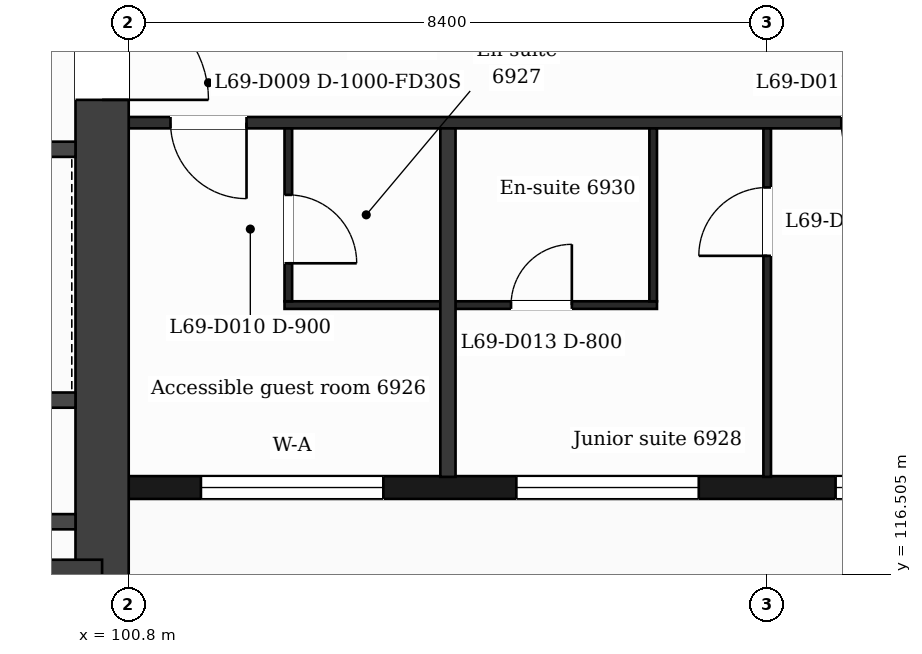
"""IFC4 building model, lengths in metres.
Left out: names, types, materials, properties, quantities, classifications, styles, units other than length and angle.
Written with IfcOpenShell. Run it as: python <this file> out.ifc"""

import sys

from ifc_helpers import new_model, si_unit, direction, frame, frame_2d, origin, place, context, subcontext, project, spatial, rectangle, extrude, element, fill, save


model = new_model("IFC4")
c1 = context("Model", 3, precision=1e-05, world=origin(), true_north=direction((0.0, 1.0)))
c2 = subcontext(c1, "Body", "Model", "MODEL_VIEW")
j1 = project(units=[si_unit("LENGTHUNIT", "METRE"), si_unit("PLANEANGLEUNIT", "RADIAN")], contexts=[c1])
p1 = place(None, origin())
s1 = spatial("IfcSite", under=j1, at=p1, CompositionType="ELEMENT")
p2 = place(p1, origin())
s2 = spatial("IfcBuilding", under=s1, at=p2, CompositionType="ELEMENT")
p3 = place(p2, frame((0.0, 0.0, 284.9)))
s3 = spatial("IfcBuildingStorey", under=s2, at=p3, CompositionType="ELEMENT", Elevation=284.9)
p4 = place(p3, frame((100.45, 132.05, 0.0), z_axis=(0.0, 0.0, 1.0), x_axis=(0.0, -1.0, 0.0)))
e1 = element("IfcWall", 1, at=p4, inside=s3, PredefinedType="SHEAR", context=c2, shape_type="SweptSolid", body=[
    extrude(rectangle(XDim=15.7, YDim=0.7, at=frame_2d((7.85, 0.0))), origin(), (0.0, 0.0, 1.0), 3.7),
])
p5 = place(p4, frame((7.9, 0.0, 0.0)))
e2 = element("IfcOpeningElement", 2, at=p5, cuts=e1, PredefinedType="OPENING", context=c2, shape_type="SweptSolid", body=[
    extrude(rectangle(XDim=1.4, YDim=2.1, at=frame_2d((0.7, 1.05))), frame((0.0, 0.36, 0.0), z_axis=(0.0, -1.0, 0.0), x_axis=(1.0, 0.0, 0.0)), (0.0, 0.0, 1.0), 0.72),
])
p6 = place(p3, frame((100.45, 116.35, 0.0), z_axis=(0.0, 0.0, 1.0), x_axis=(-1.0, 0.0, 0.0)))
e3 = element("IfcWall", 3, at=p6, inside=s3, PredefinedType="SHEAR", context=c2, shape_type="SweptSolid", body=[
    extrude(rectangle(XDim=13.627, YDim=0.7, at=frame_2d((6.813, 0.0))), origin(), (0.0, 0.0, 1.0), 3.7),
])
p7 = place(p3, frame((100.8, 117.65, 0.0), z_axis=(0.0, 0.0, 1.0), x_axis=(1.0, 0.0, 0.0)))
e4 = element("IfcWall", 4, at=p7, inside=s3, PredefinedType="SOLIDWALL", context=c2, shape_type="SweptSolid", body=[
    extrude(rectangle(XDim=25.2, YDim=0.3, at=frame_2d((12.6, 0.0))), origin(), (0.0, 0.0, 1.0), 3.38),
])
p8 = place(p7, frame((0.95, 0.0, 0.9)))
e5 = element("IfcOpeningElement", 5, at=p8, cuts=e4, PredefinedType="OPENING", context=c2, shape_type="SweptSolid", body=[
    extrude(rectangle(XDim=2.4, YDim=2.1, at=frame_2d((1.2, 1.05))), frame((0.0, 0.16, 0.0), z_axis=(0.0, -1.0, 0.0), x_axis=(1.0, 0.0, 0.0)), (0.0, 0.0, 1.0), 0.32),
])
p9 = place(p7, frame((5.1, 0.0, 0.9)))
e6 = element("IfcOpeningElement", 6, at=p9, cuts=e4, PredefinedType="OPENING", context=c2, shape_type="SweptSolid", body=[
    extrude(rectangle(XDim=2.4, YDim=2.1, at=frame_2d((1.2, 1.05))), frame((0.0, 0.16, 0.0), z_axis=(0.0, -1.0, 0.0), x_axis=(1.0, 0.0, 0.0)), (0.0, 0.0, 1.0), 0.32),
])
p10 = place(p7, frame((9.3, 0.0, 0.9)))
e7 = element("IfcOpeningElement", 7, at=p10, cuts=e4, PredefinedType="OPENING", context=c2, shape_type="SweptSolid", body=[
    extrude(rectangle(XDim=2.4, YDim=2.1, at=frame_2d((1.2, 1.05))), frame((0.0, 0.16, 0.0), z_axis=(0.0, -1.0, 0.0), x_axis=(1.0, 0.0, 0.0)), (0.0, 0.0, 1.0), 0.32),
])
p11 = place(p7, frame((14.1, 0.0, 0.9)))
e8 = element("IfcOpeningElement", 8, at=p11, cuts=e4, PredefinedType="OPENING", context=c2, shape_type="SweptSolid", body=[
    extrude(rectangle(XDim=1.2, YDim=2.1, at=frame_2d((0.6, 1.05))), frame((0.0, 0.16, 0.0), z_axis=(0.0, -1.0, 0.0), x_axis=(1.0, 0.0, 0.0)), (0.0, 0.0, 1.0), 0.32),
])
p12 = place(p7, frame((18.3, 0.0, 0.9)))
e9 = element("IfcOpeningElement", 9, at=p12, cuts=e4, PredefinedType="OPENING", context=c2, shape_type="SweptSolid", body=[
    extrude(rectangle(XDim=1.2, YDim=2.1, at=frame_2d((0.6, 1.05))), frame((0.0, 0.16, 0.0), z_axis=(0.0, -1.0, 0.0), x_axis=(1.0, 0.0, 0.0)), (0.0, 0.0, 1.0), 0.32),
])
p13 = place(p7, frame((21.75, 0.0, 0.0)))
e10 = element("IfcOpeningElement", 10, at=p13, cuts=e4, PredefinedType="OPENING", context=c2, shape_type="SweptSolid", body=[
    extrude(rectangle(XDim=1.2, YDim=2.4, at=frame_2d((0.6, 1.2))), frame((0.0, 0.16, 0.0), z_axis=(0.0, -1.0, 0.0), x_axis=(1.0, 0.0, 0.0)), (0.0, 0.0, 1.0), 0.32),
])
p14 = place(p7, frame((23.55, 0.0, 0.9)))
e11 = element("IfcOpeningElement", 11, at=p14, cuts=e4, PredefinedType="OPENING", context=c2, shape_type="SweptSolid", body=[
    extrude(rectangle(XDim=1.2, YDim=2.1, at=frame_2d((0.6, 1.05))), frame((0.0, 0.16, 0.0), z_axis=(0.0, -1.0, 0.0), x_axis=(1.0, 0.0, 0.0)), (0.0, 0.0, 1.0), 0.32),
])
for number, where, z_axis, x_axis in (
    (12, (95.227, 117.2, 0.0), (0.0, 0.0, 1.0), (1.0, 0.0, 0.0)),
    (13, (95.227, 118.8, 0.0), (0.0, 0.0, 1.0), (1.0, 0.0, 0.0)),
):
    element("IfcWall", number, at=place(p3, frame(where, z_axis=z_axis, x_axis=x_axis)), inside=s3, PredefinedType="PARTITIONING", context=c2, shape_type="SweptSolid", body=[
        extrude(rectangle(XDim=4.873, YDim=0.2, at=frame_2d((2.437, 0.0))), origin(), (0.0, 0.0, 1.0), 3.38),
    ])
p15 = place(p3, frame((102.85, 120.05, 0.0), z_axis=(0.0, 0.0, 1.0), x_axis=(1.0, 0.0, 0.0)))
e14 = element("IfcWall", 14, at=p15, inside=s3, PredefinedType="PARTITIONING", context=c2, shape_type="SweptSolid", body=[
    extrude(rectangle(XDim=4.9, YDim=0.1, at=frame_2d((2.45, 0.0))), origin(), (0.0, 0.0, 1.0), 3.38),
])
p16 = place(p15, frame((2.98, 0.0, 0.0)))
e15 = element("IfcOpeningElement", 15, at=p16, cuts=e14, PredefinedType="OPENING", context=c2, shape_type="SweptSolid", body=[
    extrude(rectangle(XDim=0.8, YDim=2.1, at=frame_2d((0.4, 1.05))), frame((0.0, 0.06, 0.0), z_axis=(0.0, -1.0, 0.0), x_axis=(1.0, 0.0, 0.0)), (0.0, 0.0, 1.0), 0.12),
])
p17 = place(p3, frame((95.227, 122.1, 0.0), z_axis=(0.0, 0.0, 1.0), x_axis=(1.0, 0.0, 0.0)))
e16 = element("IfcWall", 16, at=p17, inside=s3, PredefinedType="PARTITIONING", context=c2, shape_type="SweptSolid", body=[
    extrude(rectangle(XDim=4.873, YDim=0.2, at=frame_2d((2.437, 0.0))), origin(), (0.0, 0.0, 1.0), 3.38),
])
p18 = place(p17, frame((0.605, 0.0, 0.0)))
e17 = element("IfcOpeningElement", 17, at=p18, cuts=e16, PredefinedType="OPENING", context=c2, shape_type="SweptSolid", body=[
    extrude(rectangle(XDim=1.1, YDim=2.1, at=frame_2d((0.55, 1.05))), frame((0.0, 0.11, 0.0), z_axis=(0.0, -1.0, 0.0), x_axis=(1.0, 0.0, 0.0)), (0.0, 0.0, 1.0), 0.22),
])
p19 = place(p17, frame((2.946, 0.0, 0.0)))
e18 = element("IfcOpeningElement", 18, at=p19, cuts=e16, PredefinedType="OPENING", context=c2, shape_type="SweptSolid", body=[
    extrude(rectangle(XDim=1.1, YDim=2.1, at=frame_2d((0.55, 1.05))), frame((0.0, 0.11, 0.0), z_axis=(0.0, -1.0, 0.0), x_axis=(1.0, 0.0, 0.0)), (0.0, 0.0, 1.0), 0.22),
])
p20 = place(p3, frame((100.8, 122.45, 0.0), z_axis=(0.0, 0.0, 1.0), x_axis=(1.0, 0.0, 0.0)))
e19 = element("IfcWall", 19, at=p20, inside=s3, PredefinedType="PARTITIONING", context=c2, shape_type="SweptSolid", body=[
    extrude(rectangle(XDim=25.2, YDim=0.15, at=frame_2d((12.6, 0.0))), origin(), (0.0, 0.0, 1.0), 3.38),
])
p21 = place(p20, frame((0.55, 0.0, 0.0)))
e20 = element("IfcOpeningElement", 20, at=p21, cuts=e19, PredefinedType="OPENING", context=c2, shape_type="SweptSolid", body=[
    extrude(rectangle(XDim=1.0, YDim=2.1, at=frame_2d((0.5, 1.05))), frame((0.0, 0.085, 0.0), z_axis=(0.0, -1.0, 0.0), x_axis=(1.0, 0.0, 0.0)), (0.0, 0.0, 1.0), 0.17),
])
p22 = place(p20, frame((9.375, 0.0, 0.0)))
e21 = element("IfcOpeningElement", 21, at=p22, cuts=e19, PredefinedType="OPENING", context=c2, shape_type="SweptSolid", body=[
    extrude(rectangle(XDim=1.0, YDim=2.1, at=frame_2d((0.5, 1.05))), frame((0.0, 0.085, 0.0), z_axis=(0.0, -1.0, 0.0), x_axis=(1.0, 0.0, 0.0)), (0.0, 0.0, 1.0), 0.17),
])
p23 = place(p20, frame((13.23, 0.0, 0.0)))
e22 = element("IfcOpeningElement", 22, at=p23, cuts=e19, PredefinedType="OPENING", context=c2, shape_type="SweptSolid", body=[
    extrude(rectangle(XDim=1.0, YDim=2.1, at=frame_2d((0.5, 1.05))), frame((0.0, 0.085, 0.0), z_axis=(0.0, -1.0, 0.0), x_axis=(1.0, 0.0, 0.0)), (0.0, 0.0, 1.0), 0.17),
])
p24 = place(p20, frame((19.513, 0.0, 0.0)))
e23 = element("IfcOpeningElement", 23, at=p24, cuts=e19, PredefinedType="OPENING", context=c2, shape_type="SweptSolid", body=[
    extrude(rectangle(XDim=0.95, YDim=2.1, at=frame_2d((0.475, 1.05))), frame((0.0, 0.085, 0.0), z_axis=(0.0, -1.0, 0.0), x_axis=(1.0, 0.0, 0.0)), (0.0, 0.0, 1.0), 0.17),
])
p25 = place(p20, frame((21.7, 0.0, 0.0)))
e24 = element("IfcOpeningElement", 24, at=p25, cuts=e19, PredefinedType="OPENING", context=c2, shape_type="SweptSolid", body=[
    extrude(rectangle(XDim=1.0, YDim=2.1, at=frame_2d((0.5, 1.05))), frame((0.0, 0.085, 0.0), z_axis=(0.0, -1.0, 0.0), x_axis=(1.0, 0.0, 0.0)), (0.0, 0.0, 1.0), 0.17),
])
p26 = place(p3, frame((102.9, 120.1, 0.0), z_axis=(0.0, 0.0, 1.0), x_axis=(0.0, 1.0, 0.0)))
e25 = element("IfcWall", 25, at=p26, inside=s3, PredefinedType="PARTITIONING", context=c2, shape_type="SweptSolid", body=[
    extrude(rectangle(XDim=2.275, YDim=0.1, at=frame_2d((1.137, 0.0))), origin(), (0.0, 0.0, 1.0), 3.38),
])
p27 = place(p26, frame((0.5, 0.0, 0.0)))
e26 = element("IfcOpeningElement", 26, at=p27, cuts=e25, PredefinedType="OPENING", context=c2, shape_type="SweptSolid", body=[
    extrude(rectangle(XDim=0.9, YDim=2.1, at=frame_2d((0.45, 1.05))), frame((0.0, 0.06, 0.0), z_axis=(0.0, -1.0, 0.0), x_axis=(1.0, 0.0, 0.0)), (0.0, 0.0, 1.0), 0.12),
])
p28 = place(p3, frame((105.0, 117.79, 0.0), z_axis=(0.0, 0.0, 1.0), x_axis=(0.0, 1.0, 0.0)))
e27 = element("IfcWall", 27, at=p28, inside=s3, PredefinedType="PARTITIONING", context=c2, shape_type="SweptSolid", body=[
    extrude(rectangle(XDim=4.585, YDim=0.2, at=frame_2d((2.292, 0.0))), origin(), (0.0, 0.0, 1.0), 3.38),
])
p29 = place(p3, frame((107.7, 120.1, 0.0), z_axis=(0.0, 0.0, 1.0), x_axis=(0.0, 1.0, 0.0)))
e28 = element("IfcWall", 28, at=p29, inside=s3, PredefinedType="PARTITIONING", context=c2, shape_type="SweptSolid", body=[
    extrude(rectangle(XDim=2.275, YDim=0.1, at=frame_2d((1.137, 0.0))), origin(), (0.0, 0.0, 1.0), 3.38),
])
p30 = place(p3, frame((109.2, 117.79, 0.0), z_axis=(0.0, 0.0, 1.0), x_axis=(0.0, 1.0, 0.0)))
e29 = element("IfcWall", 29, at=p30, inside=s3, PredefinedType="PARTITIONING", context=c2, shape_type="SweptSolid", body=[
    extrude(rectangle(XDim=4.585, YDim=0.1, at=frame_2d((2.292, 0.0))), origin(), (0.0, 0.0, 1.0), 3.38),
])
p31 = place(p30, frame((2.908, 0.0, 0.0)))
e30 = element("IfcOpeningElement", 30, at=p31, cuts=e29, PredefinedType="OPENING", context=c2, shape_type="SweptSolid", body=[
    extrude(rectangle(XDim=0.9, YDim=2.1, at=frame_2d((0.45, 1.05))), frame((0.0, 0.06, 0.0), z_axis=(0.0, -1.0, 0.0), x_axis=(1.0, 0.0, 0.0)), (0.0, 0.0, 1.0), 0.12),
])
p32 = place(p8, origin())
e31 = element("IfcWindow", 31, at=p32, inside=s3, PartitioningType="SINGLE_PANEL", PredefinedType="WINDOW", context=c2, shape_type="SweptSolid", body=[
    extrude(rectangle(XDim=2.4, YDim=2.1, at=frame_2d((1.2, 1.05))), frame((0.0, 0.03, 0.0), z_axis=(0.0, -1.0, 0.0), x_axis=(1.0, 0.0, 0.0)), (0.0, 0.0, 1.0), 0.06),
])
fill(e5, e31)
p33 = place(p9, origin())
e32 = element("IfcWindow", 32, at=p33, inside=s3, PartitioningType="SINGLE_PANEL", PredefinedType="WINDOW", context=c2, shape_type="SweptSolid", body=[
    extrude(rectangle(XDim=2.4, YDim=2.1, at=frame_2d((1.2, 1.05))), frame((0.0, 0.03, 0.0), z_axis=(0.0, -1.0, 0.0), x_axis=(1.0, 0.0, 0.0)), (0.0, 0.0, 1.0), 0.06),
])
fill(e6, e32)
p34 = place(p10, origin())
e33 = element("IfcWindow", 33, at=p34, inside=s3, PartitioningType="SINGLE_PANEL", PredefinedType="WINDOW", context=c2, shape_type="SweptSolid", body=[
    extrude(rectangle(XDim=2.4, YDim=2.1, at=frame_2d((1.2, 1.05))), frame((0.0, 0.03, 0.0), z_axis=(0.0, -1.0, 0.0), x_axis=(1.0, 0.0, 0.0)), (0.0, 0.0, 1.0), 0.06),
])
fill(e7, e33)
p35 = place(p21, origin())
e34 = element("IfcDoor", 34, at=p35, inside=s3, OperationType="SINGLE_SWING_RIGHT", PredefinedType="DOOR", context=c2, shape_type="SweptSolid", body=[
    extrude(rectangle(XDim=1.0, YDim=2.1, at=frame_2d((0.5, 1.05))), frame((0.0, 0.025, 0.0), z_axis=(0.0, -1.0, 0.0), x_axis=(1.0, 0.0, 0.0)), (0.0, 0.0, 1.0), 0.05),
])
fill(e20, e34)
p36 = place(p27, origin())
e35 = element("IfcDoor", 35, at=p36, inside=s3, OperationType="SINGLE_SWING_LEFT", PredefinedType="DOOR", context=c2, shape_type="SweptSolid", body=[
    extrude(rectangle(XDim=0.9, YDim=2.1, at=frame_2d((0.45, 1.05))), frame((0.0, 0.025, 0.0), z_axis=(0.0, -1.0, 0.0), x_axis=(1.0, 0.0, 0.0)), (0.0, 0.0, 1.0), 0.05),
])
fill(e26, e35)
p37 = place(p22, origin())
e36 = element("IfcDoor", 36, at=p37, inside=s3, OperationType="SINGLE_SWING_RIGHT", PredefinedType="DOOR", context=c2, shape_type="SweptSolid", body=[
    extrude(rectangle(XDim=1.0, YDim=2.1, at=frame_2d((0.5, 1.05))), frame((0.0, 0.025, 0.0), z_axis=(0.0, -1.0, 0.0), x_axis=(1.0, 0.0, 0.0)), (0.0, 0.0, 1.0), 0.05),
])
fill(e21, e36)
p38 = place(p31, origin())
e37 = element("IfcDoor", 37, at=p38, inside=s3, OperationType="SINGLE_SWING_LEFT", PredefinedType="DOOR", context=c2, shape_type="SweptSolid", body=[
    extrude(rectangle(XDim=0.9, YDim=2.1, at=frame_2d((0.45, 1.05))), frame((0.0, 0.025, 0.0), z_axis=(0.0, -1.0, 0.0), x_axis=(1.0, 0.0, 0.0)), (0.0, 0.0, 1.0), 0.05),
])
fill(e30, e37)
p39 = place(p16, origin())
e38 = element("IfcDoor", 38, at=p39, inside=s3, OperationType="SINGLE_SWING_RIGHT", PredefinedType="DOOR", context=c2, shape_type="SweptSolid", body=[
    extrude(rectangle(XDim=0.8, YDim=2.1, at=frame_2d((0.4, 1.05))), frame((0.0, 0.025, 0.0), z_axis=(0.0, -1.0, 0.0), x_axis=(1.0, 0.0, 0.0)), (0.0, 0.0, 1.0), 0.05),
])
fill(e15, e38)
p40 = place(p5, origin())
e39 = element("IfcDoor", 39, at=p40, inside=s3, OperationType="SINGLE_SWING_RIGHT", PredefinedType="DOOR", context=c2, shape_type="SweptSolid", body=[
    extrude(rectangle(XDim=1.4, YDim=2.1, at=frame_2d((0.7, 1.05))), frame((0.0, 0.025, 0.0), z_axis=(0.0, -1.0, 0.0), x_axis=(1.0, 0.0, 0.0)), (0.0, 0.0, 1.0), 0.05),
])
fill(e2, e39)
save(model, sys.argv[1])
